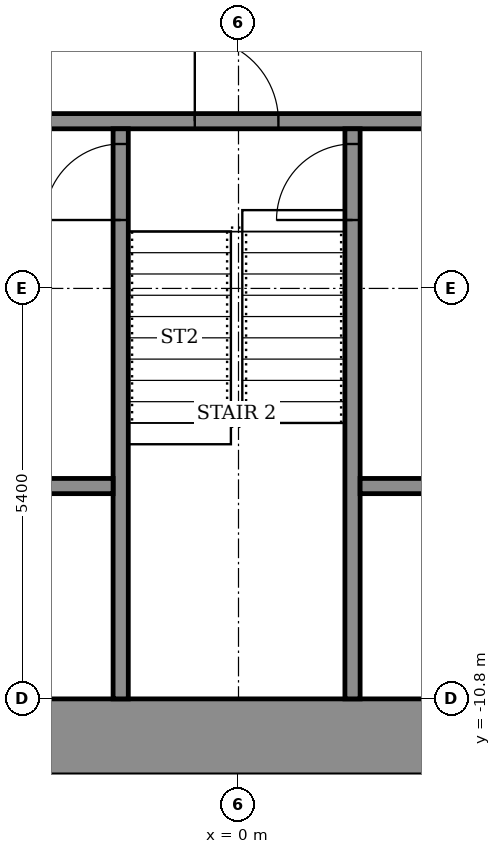
"""IFC4 building model, lengths in metres.
Left out: names, types, materials, properties, quantities, classifications, styles, units other than length and angle.
Written with IfcOpenShell. Run it as: python <this file> out.ifc"""

import sys

from ifc_helpers import new_model, si_unit, direction, frame, frame_2d, origin, place, context, subcontext, project, spatial, rectangle, extrude, element, fill, save


model = new_model("IFC4")
c1 = context("Model", 3, precision=1e-05, world=origin(), true_north=direction((0.0, 1.0)))
c2 = subcontext(c1, "Body", "Model", "MODEL_VIEW")
j1 = project(units=[si_unit("LENGTHUNIT", "METRE"), si_unit("PLANEANGLEUNIT", "RADIAN")], contexts=[c1])
p1 = place(None, origin())
s1 = spatial("IfcSite", under=j1, at=p1, CompositionType="ELEMENT")
p2 = place(p1, origin())
s2 = spatial("IfcBuilding", under=s1, at=p2, CompositionType="ELEMENT")
p3 = place(p2, frame((0.0, 0.0, 109.1)))
s3 = spatial("IfcBuildingStorey", under=s2, at=p3, CompositionType="ELEMENT", Elevation=109.1)
p4 = place(p3, frame((-14.8, -11.3, 0.0), z_axis=(0.0, 0.0, 1.0), x_axis=(1.0, 0.0, 0.0)))
e1 = element("IfcWall", 1, at=p4, inside=s3, PredefinedType="SHEAR", context=c2, shape_type="SweptSolid", body=[
    extrude(rectangle(XDim=29.6, YDim=1.0, at=frame_2d((14.8, 0.0))), origin(), (0.0, 0.0, 1.0), 3.6),
])
p5 = place(p3, frame((-10.9, -3.2, 0.0), z_axis=(0.0, 0.0, 1.0), x_axis=(1.0, 0.0, 0.0)))
e2 = element("IfcWall", 2, at=p5, inside=s3, PredefinedType="SHEAR", context=c2, shape_type="SweptSolid", body=[
    extrude(rectangle(XDim=21.8, YDim=0.2, at=frame_2d((10.9, 0.0))), origin(), (0.0, 0.0, 1.0), 3.05),
])
p6 = place(p5, frame((1.075, 0.0, 0.0)))
e3 = element("IfcOpeningElement", 3, at=p6, cuts=e2, PredefinedType="OPENING", context=c2, shape_type="SweptSolid", body=[
    extrude(rectangle(XDim=1.1, YDim=2.1, at=frame_2d((0.55, 1.05))), frame((0.0, 0.11, 0.0), z_axis=(0.0, -1.0, 0.0), x_axis=(1.0, 0.0, 0.0)), (0.0, 0.0, 1.0), 0.22),
])
p7 = place(p5, frame((10.325, 0.0, 0.0)))
e4 = element("IfcOpeningElement", 4, at=p7, cuts=e2, PredefinedType="OPENING", context=c2, shape_type="SweptSolid", body=[
    extrude(rectangle(XDim=1.1, YDim=2.1, at=frame_2d((0.55, 1.05))), frame((0.0, 0.11, 0.0), z_axis=(0.0, -1.0, 0.0), x_axis=(1.0, 0.0, 0.0)), (0.0, 0.0, 1.0), 0.22),
])
p8 = place(p5, frame((19.625, 0.0, 0.0)))
e5 = element("IfcOpeningElement", 5, at=p8, cuts=e2, PredefinedType="OPENING", context=c2, shape_type="SweptSolid", body=[
    extrude(rectangle(XDim=1.1, YDim=2.1, at=frame_2d((0.55, 1.05))), frame((0.0, 0.11, 0.0), z_axis=(0.0, -1.0, 0.0), x_axis=(1.0, 0.0, 0.0)), (0.0, 0.0, 1.0), 0.22),
])
p9 = place(p5, frame((5.7, 0.0, 0.0)))
e6 = element("IfcOpeningElement", 6, at=p9, cuts=e2, PredefinedType="OPENING", context=c2, shape_type="SweptSolid", body=[
    extrude(rectangle(XDim=1.1, YDim=2.1, at=frame_2d((0.55, 1.05))), frame((0.0, 0.11, 0.0), z_axis=(0.0, -1.0, 0.0), x_axis=(1.0, 0.0, 0.0)), (0.0, 0.0, 1.0), 0.22),
])
p10 = place(p5, frame((14.975, 0.0, 0.0)))
e7 = element("IfcOpeningElement", 7, at=p10, cuts=e2, PredefinedType="OPENING", context=c2, shape_type="SweptSolid", body=[
    extrude(rectangle(XDim=1.1, YDim=2.1, at=frame_2d((0.55, 1.05))), frame((0.0, 0.11, 0.0), z_axis=(0.0, -1.0, 0.0), x_axis=(1.0, 0.0, 0.0)), (0.0, 0.0, 1.0), 0.22),
])
p11 = place(p3, frame((-1.55, -10.8, 0.0), z_axis=(0.0, 0.0, 1.0), x_axis=(0.0, 1.0, 0.0)))
e8 = element("IfcWall", 8, at=p11, inside=s3, PredefinedType="SHEAR", context=c2, shape_type="SweptSolid", body=[
    extrude(rectangle(XDim=7.5, YDim=0.2, at=frame_2d((3.75, 0.0))), origin(), (0.0, 0.0, 1.0), 3.05),
])
p12 = place(p11, frame((6.3, 0.0, 0.0)))
e9 = element("IfcOpeningElement", 9, at=p12, cuts=e8, PredefinedType="OPENING", context=c2, shape_type="SweptSolid", body=[
    extrude(rectangle(XDim=1.0, YDim=2.1, at=frame_2d((0.5, 1.05))), frame((0.0, 0.11, 0.0), z_axis=(0.0, -1.0, 0.0), x_axis=(1.0, 0.0, 0.0)), (0.0, 0.0, 1.0), 0.22),
])
p13 = place(p3, frame((1.5, -10.8, 0.0), z_axis=(0.0, 0.0, 1.0), x_axis=(0.0, 1.0, 0.0)))
e10 = element("IfcWall", 10, at=p13, inside=s3, PredefinedType="SHEAR", context=c2, shape_type="SweptSolid", body=[
    extrude(rectangle(XDim=7.5, YDim=0.2, at=frame_2d((3.75, 0.0))), origin(), (0.0, 0.0, 1.0), 3.05),
])
p14 = place(p13, frame((6.3, 0.0, 0.0)))
e11 = element("IfcOpeningElement", 11, at=p14, cuts=e10, PredefinedType="OPENING", context=c2, shape_type="SweptSolid", body=[
    extrude(rectangle(XDim=1.0, YDim=2.1, at=frame_2d((0.5, 1.05))), frame((0.0, 0.11, 0.0), z_axis=(0.0, -1.0, 0.0), x_axis=(1.0, 0.0, 0.0)), (0.0, 0.0, 1.0), 0.22),
])
p15 = place(p3, frame((-7.65, -8.0, 0.0), z_axis=(0.0, 0.0, 1.0), x_axis=(1.0, 0.0, 0.0)))
e12 = element("IfcWall", 12, at=p15, inside=s3, PredefinedType="SHEAR", context=c2, shape_type="SweptSolid", body=[
    extrude(rectangle(XDim=6.0, YDim=0.2, at=frame_2d((3.0, 0.0))), origin(), (0.0, 0.0, 1.0), 3.05),
])
p16 = place(p15, frame((0.9, 0.0, 0.0)))
e13 = element("IfcOpeningElement", 13, at=p16, cuts=e12, PredefinedType="OPENING", context=c2, shape_type="SweptSolid", body=[
    extrude(rectangle(XDim=1.1, YDim=2.1, at=frame_2d((0.55, 1.05))), frame((0.0, 0.11, 0.0), z_axis=(0.0, -1.0, 0.0), x_axis=(1.0, 0.0, 0.0)), (0.0, 0.0, 1.0), 0.22),
])
p17 = place(p15, frame((4.0, 0.0, 0.0)))
e14 = element("IfcOpeningElement", 14, at=p17, cuts=e12, PredefinedType="OPENING", context=c2, shape_type="SweptSolid", body=[
    extrude(rectangle(XDim=1.1, YDim=2.1, at=frame_2d((0.55, 1.05))), frame((0.0, 0.11, 0.0), z_axis=(0.0, -1.0, 0.0), x_axis=(1.0, 0.0, 0.0)), (0.0, 0.0, 1.0), 0.22),
])
p18 = place(p3, frame((1.6, -8.0, 0.0), z_axis=(0.0, 0.0, 1.0), x_axis=(1.0, 0.0, 0.0)))
e15 = element("IfcWall", 15, at=p18, inside=s3, PredefinedType="SHEAR", context=c2, shape_type="SweptSolid", body=[
    extrude(rectangle(XDim=6.05, YDim=0.2, at=frame_2d((3.025, 0.0))), origin(), (0.0, 0.0, 1.0), 3.05),
])
p19 = place(p18, frame((0.913, 0.0, 0.0)))
e16 = element("IfcOpeningElement", 16, at=p19, cuts=e15, PredefinedType="OPENING", context=c2, shape_type="SweptSolid", body=[
    extrude(rectangle(XDim=1.1, YDim=2.1, at=frame_2d((0.55, 1.05))), frame((0.0, 0.11, 0.0), z_axis=(0.0, -1.0, 0.0), x_axis=(1.0, 0.0, 0.0)), (0.0, 0.0, 1.0), 0.22),
])
p20 = place(p18, frame((4.038, 0.0, 0.0)))
e17 = element("IfcOpeningElement", 17, at=p20, cuts=e15, PredefinedType="OPENING", context=c2, shape_type="SweptSolid", body=[
    extrude(rectangle(XDim=1.1, YDim=2.1, at=frame_2d((0.55, 1.05))), frame((0.0, 0.11, 0.0), z_axis=(0.0, -1.0, 0.0), x_axis=(1.0, 0.0, 0.0)), (0.0, 0.0, 1.0), 0.22),
])
p21 = place(p7, origin())
e18 = element("IfcDoor", 18, at=p21, inside=s3, OperationType="SINGLE_SWING_RIGHT", PredefinedType="DOOR", context=c2, shape_type="SweptSolid", body=[
    extrude(rectangle(XDim=1.1, YDim=2.1, at=frame_2d((0.55, 1.05))), frame((0.0, 0.025, 0.0), z_axis=(0.0, -1.0, 0.0), x_axis=(1.0, 0.0, 0.0)), (0.0, 0.0, 1.0), 0.05),
])
fill(e4, e18)
p22 = place(p12, origin())
e19 = element("IfcDoor", 19, at=p22, inside=s3, OperationType="SINGLE_SWING_RIGHT", PredefinedType="DOOR", context=c2, shape_type="SweptSolid", body=[
    extrude(rectangle(XDim=1.0, YDim=2.1, at=frame_2d((0.5, 1.05))), frame((0.0, 0.025, 0.0), z_axis=(0.0, -1.0, 0.0), x_axis=(1.0, 0.0, 0.0)), (0.0, 0.0, 1.0), 0.05),
])
fill(e9, e19)
p23 = place(p14, origin())
e20 = element("IfcDoor", 20, at=p23, inside=s3, OperationType="SINGLE_SWING_RIGHT", PredefinedType="DOOR", context=c2, shape_type="SweptSolid", body=[
    extrude(rectangle(XDim=1.0, YDim=2.1, at=frame_2d((0.5, 1.05))), frame((0.0, 0.025, 0.0), z_axis=(0.0, -1.0, 0.0), x_axis=(1.0, 0.0, 0.0)), (0.0, 0.0, 1.0), 0.05),
])
fill(e11, e20)
save(model, sys.argv[1])
